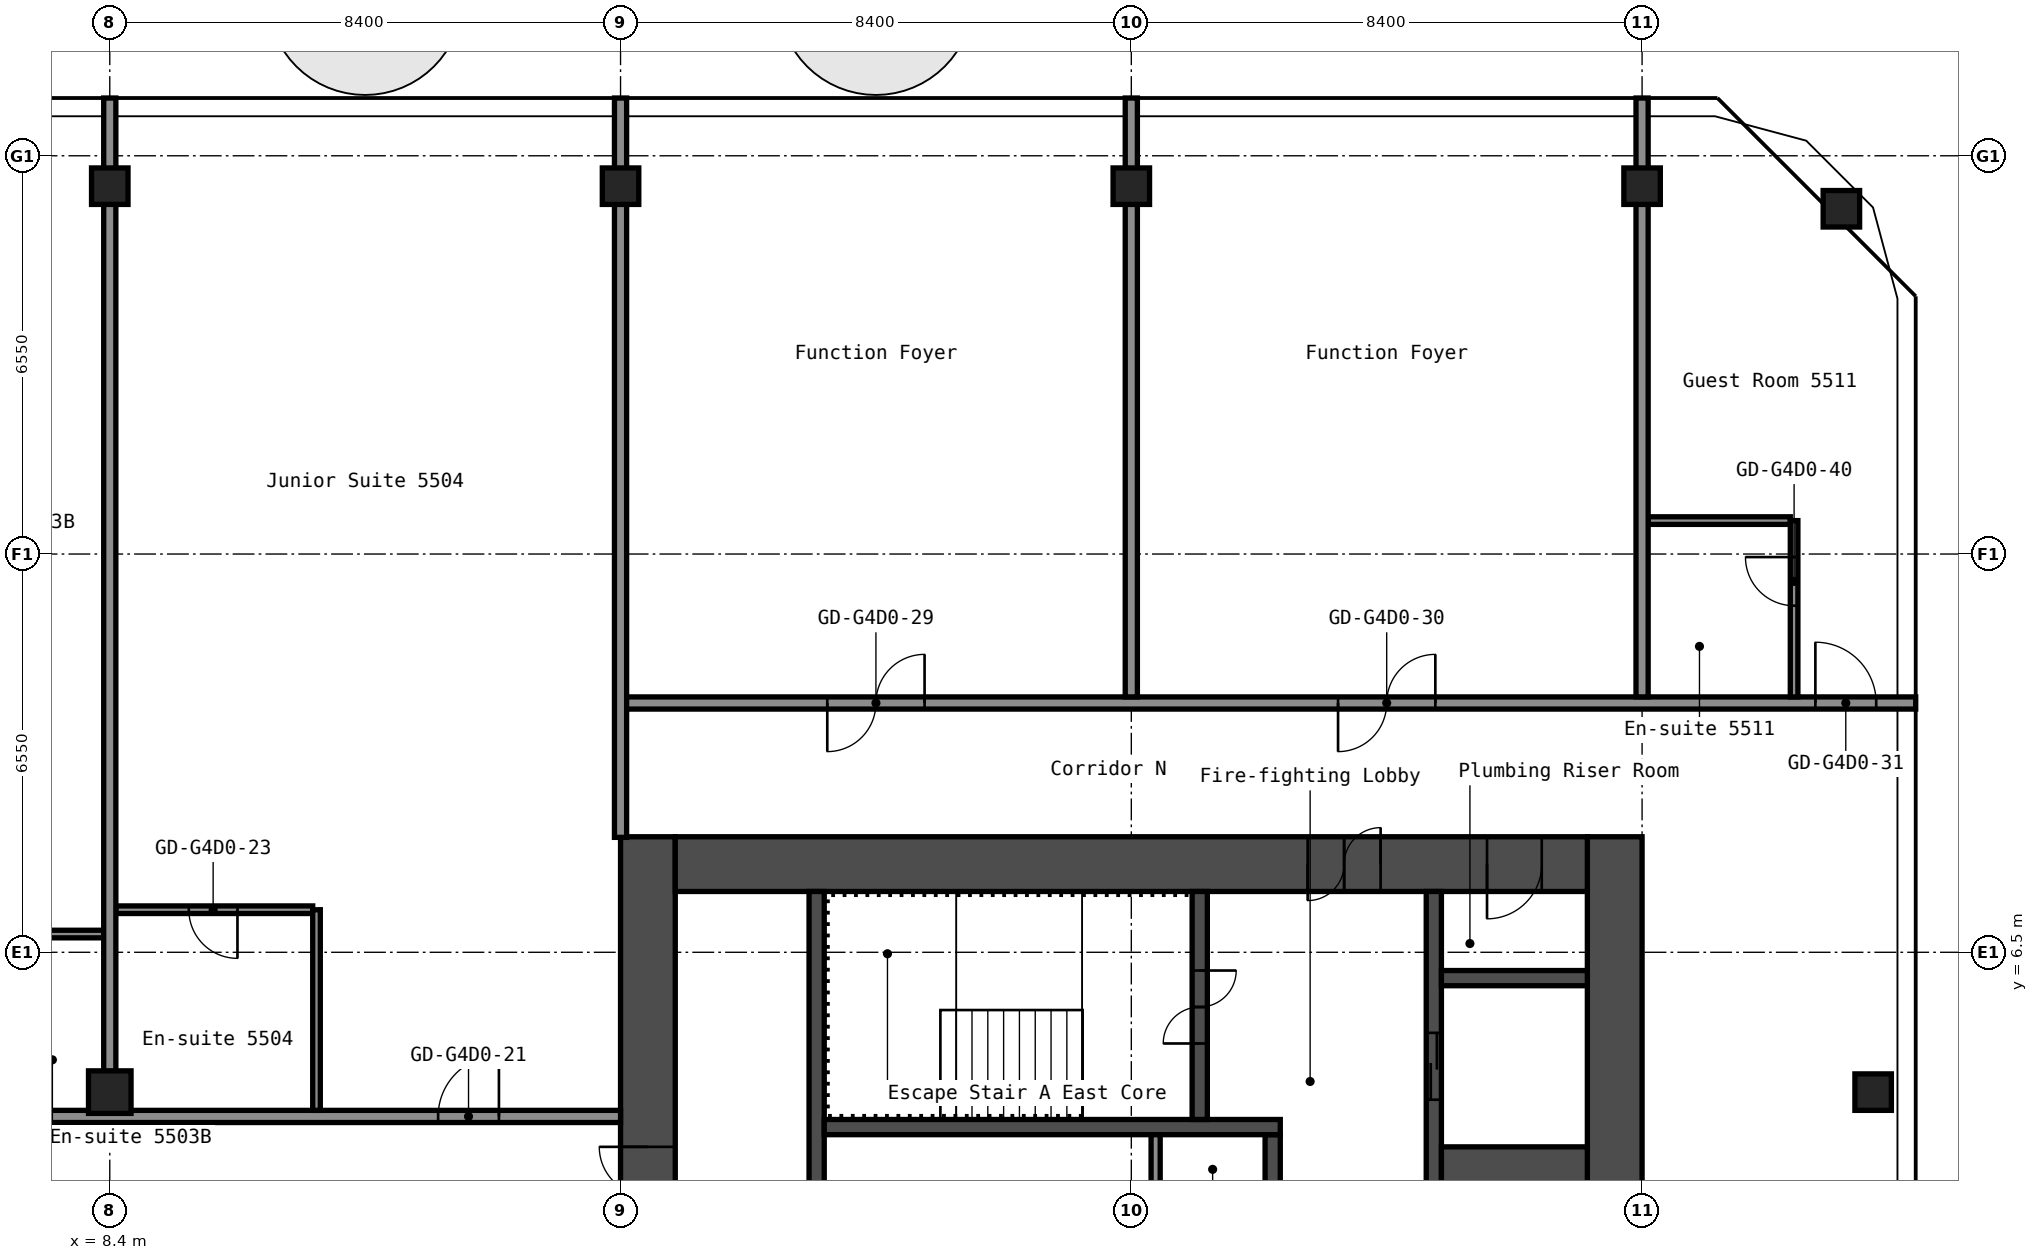
"""IFC4 building model, lengths in metres.
Left out: names, types, materials, properties, quantities, classifications, styles, units other than length and angle.
Written with IfcOpenShell. Run it as: python <this file> out.ifc"""

import sys

from ifc_helpers import new_model, si_unit, direction, frame, frame_2d, origin, origin_2d, place, context, subcontext, project, spatial, rectangle, hollow_rectangle, extrude, element, fill, save


model = new_model("IFC4")
c1 = context("Model", 3, precision=1e-05, world=origin(), true_north=direction((0.0, 1.0)))
c2 = subcontext(c1, "Body", "Model", "MODEL_VIEW")
j1 = project(units=[si_unit("LENGTHUNIT", "METRE"), si_unit("PLANEANGLEUNIT", "RADIAN")], contexts=[c1])
p1 = place(None, origin())
s1 = spatial("IfcSite", under=j1, at=p1, CompositionType="ELEMENT")
p2 = place(p1, origin())
s2 = spatial("IfcBuilding", under=s1, at=p2, CompositionType="ELEMENT")
p3 = place(p2, frame((0.0, 0.0, 196.2)))
s3 = spatial("IfcBuildingStorey", under=s2, at=p3, CompositionType="ELEMENT", Elevation=196.2)
p4 = place(p3, frame((8.4, 4.2, 0.0), z_axis=(0.0, 0.0, 1.0), x_axis=(1.0, 0.0, 0.0)))
e1 = element("IfcColumn", 1, at=p4, inside=s3, PredefinedType="COLUMN", context=c2, shape_type="SweptSolid", body=[
    extrude(hollow_rectangle(XDim=0.7, YDim=0.7, WallThickness=0.028, at=origin_2d()), origin(), (0.0, 0.0, 1.0), 2.75),
])
for number, where, z_axis, x_axis in (
    (2, (8.4, 19.1, 0.0), (0.0, 0.0, 1.0), (1.0, 0.0, 0.0)),
    (3, (16.8, 19.1, 0.0), (0.0, 0.0, 1.0), (1.0, 0.0, 0.0)),
    (4, (25.2, 19.1, 0.0), (0.0, 0.0, 1.0), (1.0, 0.0, 0.0)),
    (5, (33.6, 19.1, 0.0), (0.0, 0.0, 1.0), (1.0, 0.0, 0.0)),
    (6, (37.4, 4.2, 0.0), (0.0, 0.0, 1.0), (1.0, 0.0, 0.0)),
    (7, (36.878, 18.729, 0.0), (0.0, 0.0, 1.0), (1.0, 0.0, 0.0)),
):
    element("IfcColumn", number, at=place(p3, frame(where, z_axis=z_axis, x_axis=x_axis)), inside=s3, PredefinedType="COLUMN", context=c2, shape_type="SweptSolid", body=[
        extrude(hollow_rectangle(XDim=0.6, YDim=0.6, WallThickness=0.025, InnerFilletRadius=0.038, OuterFilletRadius=0.062, at=origin_2d()), origin(), (0.0, 0.0, 1.0), 2.75),
    ])
p5 = place(p3, frame((17.25, -8.4, 0.0), z_axis=(0.0, 0.0, 1.0), x_axis=(0.0, 1.0, 0.0)))
e8 = element("IfcWall", 8, at=p5, inside=s3, PredefinedType="SHEAR", context=c2, shape_type="SweptSolid", body=[
    extrude(rectangle(XDim=16.8, YDim=0.9, at=frame_2d((8.4, 0.0))), origin(), (0.0, 0.0, 1.0), 2.75),
])
p6 = place(p5, frame((10.1, 0.0, 0.0)))
e9 = element("IfcOpeningElement", 9, at=p6, cuts=e8, PredefinedType="OPENING", context=c2, shape_type="SweptSolid", body=[
    extrude(rectangle(XDim=1.6, YDim=2.1, at=frame_2d((0.8, 1.05))), frame((0.0, 0.46, 0.0), z_axis=(0.0, -1.0, 0.0), x_axis=(1.0, 0.0, 0.0)), (0.0, 0.0, 1.0), 0.92),
])
p7 = place(p3, frame((33.15, -8.4, 0.0), z_axis=(0.0, 0.0, 1.0), x_axis=(0.0, 1.0, 0.0)))
e10 = element("IfcWall", 10, at=p7, inside=s3, PredefinedType="SHEAR", context=c2, shape_type="SweptSolid", body=[
    extrude(rectangle(XDim=16.8, YDim=0.9, at=frame_2d((8.4, 0.0))), origin(), (0.0, 0.0, 1.0), 2.75),
])
p8 = place(p3, frame((17.7, 7.95, 0.0), z_axis=(0.0, 0.0, 1.0), x_axis=(1.0, 0.0, 0.0)))
e11 = element("IfcWall", 11, at=p8, inside=s3, PredefinedType="SHEAR", context=c2, shape_type="SweptSolid", body=[
    extrude(rectangle(XDim=15.0, YDim=0.9, at=frame_2d((7.5, 0.0))), origin(), (0.0, 0.0, 1.0), 2.75),
])
p9 = place(p8, frame((10.4, 0.0, 0.0)))
e12 = element("IfcOpeningElement", 12, at=p9, cuts=e11, PredefinedType="OPENING", context=c2, shape_type="SweptSolid", body=[
    extrude(rectangle(XDim=1.2, YDim=2.1, at=frame_2d((0.6, 1.05))), frame((0.0, 0.46, 0.0), z_axis=(0.0, -1.0, 0.0), x_axis=(1.0, 0.0, 0.0)), (0.0, 0.0, 1.0), 0.92),
])
p10 = place(p8, frame((13.35, 0.0, 0.0)))
e13 = element("IfcOpeningElement", 13, at=p10, cuts=e11, PredefinedType="OPENING", context=c2, shape_type="SweptSolid", body=[
    extrude(rectangle(XDim=0.9, YDim=2.1, at=frame_2d((0.45, 1.05))), frame((0.0, 0.46, 0.0), z_axis=(0.0, -1.0, 0.0), x_axis=(1.0, 0.0, 0.0)), (0.0, 0.0, 1.0), 0.92),
])
p11 = place(p3, frame((20.025, 1.2, 0.0), z_axis=(0.0, 0.0, 1.0), x_axis=(0.0, 1.0, 0.0)))
e14 = element("IfcWall", 14, at=p11, inside=s3, PredefinedType="SHEAR", context=c2, shape_type="SweptSolid", body=[
    extrude(rectangle(XDim=6.3, YDim=0.25, at=frame_2d((3.15, 0.0))), origin(), (0.0, 0.0, 1.0), 2.75),
])
p12 = place(p3, frame((27.525, 1.45, 0.0), z_axis=(0.0, 0.0, 1.0), x_axis=(0.0, 1.0, 0.0)))
e15 = element("IfcWall", 15, at=p12, inside=s3, PredefinedType="SHEAR", context=c2, shape_type="SweptSolid", body=[
    extrude(rectangle(XDim=2.05, YDim=0.25, at=frame_2d((1.025, 0.0))), origin(), (0.0, 0.0, 1.0), 2.75),
])
p13 = place(p3, frame((20.15, 3.625, 0.0), z_axis=(0.0, 0.0, 1.0), x_axis=(1.0, 0.0, 0.0)))
e16 = element("IfcWall", 16, at=p13, inside=s3, PredefinedType="SHEAR", context=c2, shape_type="SweptSolid", body=[
    extrude(rectangle(XDim=7.5, YDim=0.25, at=frame_2d((3.75, 0.0))), origin(), (0.0, 0.0, 1.0), 2.75),
])
p14 = place(p3, frame((26.325, 3.75, 0.0), z_axis=(0.0, 0.0, 1.0), x_axis=(0.0, 1.0, 0.0)))
e17 = element("IfcWall", 17, at=p14, inside=s3, PredefinedType="SHEAR", context=c2, shape_type="SweptSolid", body=[
    extrude(rectangle(XDim=3.75, YDim=0.25, at=frame_2d((1.875, 0.0))), origin(), (0.0, 0.0, 1.0), 2.75),
])
p15 = place(p14, frame((1.25, 0.0, 0.0)))
e18 = element("IfcOpeningElement", 18, at=p15, cuts=e17, PredefinedType="OPENING", context=c2, shape_type="SweptSolid", body=[
    extrude(rectangle(XDim=1.2, YDim=2.1, at=frame_2d((0.6, 1.05))), frame((0.0, 0.135, 0.0), z_axis=(0.0, -1.0, 0.0), x_axis=(1.0, 0.0, 0.0)), (0.0, 0.0, 1.0), 0.27),
])
p16 = place(p3, frame((30.175, 1.45, 0.0), z_axis=(0.0, 0.0, 1.0), x_axis=(0.0, 1.0, 0.0)))
e19 = element("IfcWall", 19, at=p16, inside=s3, PredefinedType="SHEAR", context=c2, shape_type="SweptSolid", body=[
    extrude(rectangle(XDim=6.05, YDim=0.25, at=frame_2d((3.025, 0.0))), origin(), (0.0, 0.0, 1.0), 2.75),
])
p17 = place(p16, frame((2.625, 0.0, 0.0)))
e20 = element("IfcOpeningElement", 20, at=p17, cuts=e19, PredefinedType="OPENING", context=c2, shape_type="SweptSolid", body=[
    extrude(rectangle(XDim=1.1, YDim=2.1, at=frame_2d((0.55, 1.05))), frame((0.0, 0.135, 0.0), z_axis=(0.0, -1.0, 0.0), x_axis=(1.0, 0.0, 0.0)), (0.0, 0.0, 1.0), 0.27),
])
p18 = place(p3, frame((30.3, 2.375, 0.0), z_axis=(0.0, 0.0, 1.0), x_axis=(1.0, 0.0, 0.0)))
e21 = element("IfcWall", 21, at=p18, inside=s3, PredefinedType="SHEAR", context=c2, shape_type="SweptSolid", body=[
    extrude(rectangle(XDim=2.4, YDim=1.85, at=frame_2d((1.2, 0.0))), origin(), (0.0, 0.0, 1.0), 2.75),
])
p19 = place(p3, frame((30.3, 6.075, 0.0), z_axis=(0.0, 0.0, 1.0), x_axis=(1.0, 0.0, 0.0)))
e22 = element("IfcWall", 22, at=p19, inside=s3, PredefinedType="SHEAR", context=c2, shape_type="SweptSolid", body=[
    extrude(rectangle(XDim=2.4, YDim=0.25, at=frame_2d((1.2, 0.0))), origin(), (0.0, 0.0, 1.0), 2.75),
])
p20 = place(p3, frame((25.6, 1.45, 0.0), z_axis=(0.0, 0.0, 1.0), x_axis=(0.0, 1.0, 0.0)))
e23 = element("IfcWall", 23, at=p20, inside=s3, PredefinedType="PARTITIONING", context=c2, shape_type="SweptSolid", body=[
    extrude(rectangle(XDim=2.05, YDim=0.15, at=frame_2d((1.025, 0.0))), origin(), (0.0, 0.0, 1.0), 2.75),
])
p21 = place(p3, frame((-16.8, 3.8, 0.0), z_axis=(0.0, 0.0, 1.0), x_axis=(1.0, 0.0, 0.0)))
e24 = element("IfcWall", 24, at=p21, inside=s3, PredefinedType="PARTITIONING", context=c2, shape_type="SweptSolid", body=[
    extrude(rectangle(XDim=33.6, YDim=0.2, at=frame_2d((16.8, 0.0))), origin(), (0.0, 0.0, 1.0), 2.75),
])
p22 = place(p21, frame((2.85, 0.0, 0.0)))
e25 = element("IfcOpeningElement", 25, at=p22, cuts=e24, PredefinedType="OPENING", context=c2, shape_type="SweptSolid", body=[
    extrude(rectangle(XDim=1.0, YDim=2.1, at=frame_2d((0.5, 1.05))), frame((0.0, 0.11, 0.0), z_axis=(0.0, -1.0, 0.0), x_axis=(1.0, 0.0, 0.0)), (0.0, 0.0, 1.0), 0.22),
])
p23 = place(p21, frame((4.55, 0.0, 0.0)))
e26 = element("IfcOpeningElement", 26, at=p23, cuts=e24, PredefinedType="OPENING", context=c2, shape_type="SweptSolid", body=[
    extrude(rectangle(XDim=1.0, YDim=2.1, at=frame_2d((0.5, 1.05))), frame((0.0, 0.11, 0.0), z_axis=(0.0, -1.0, 0.0), x_axis=(1.0, 0.0, 0.0)), (0.0, 0.0, 1.0), 0.22),
])
p24 = place(p21, frame((10.4, 0.0, 0.0)))
e27 = element("IfcOpeningElement", 27, at=p24, cuts=e24, PredefinedType="OPENING", context=c2, shape_type="SweptSolid", body=[
    extrude(rectangle(XDim=1.0, YDim=2.1, at=frame_2d((0.5, 1.05))), frame((0.0, 0.11, 0.0), z_axis=(0.0, -1.0, 0.0), x_axis=(1.0, 0.0, 0.0)), (0.0, 0.0, 1.0), 0.22),
])
p25 = place(p21, frame((19.65, 0.0, 0.0)))
e28 = element("IfcOpeningElement", 28, at=p25, cuts=e24, PredefinedType="OPENING", context=c2, shape_type="SweptSolid", body=[
    extrude(rectangle(XDim=1.0, YDim=2.1, at=frame_2d((0.5, 1.05))), frame((0.0, 0.11, 0.0), z_axis=(0.0, -1.0, 0.0), x_axis=(1.0, 0.0, 0.0)), (0.0, 0.0, 1.0), 0.22),
])
p26 = place(p21, frame((21.35, 0.0, 0.0)))
e29 = element("IfcOpeningElement", 29, at=p26, cuts=e24, PredefinedType="OPENING", context=c2, shape_type="SweptSolid", body=[
    extrude(rectangle(XDim=1.0, YDim=2.1, at=frame_2d((0.5, 1.05))), frame((0.0, 0.11, 0.0), z_axis=(0.0, -1.0, 0.0), x_axis=(1.0, 0.0, 0.0)), (0.0, 0.0, 1.0), 0.22),
])
p27 = place(p21, frame((30.6, 0.0, 0.0)))
e30 = element("IfcOpeningElement", 30, at=p27, cuts=e24, PredefinedType="OPENING", context=c2, shape_type="SweptSolid", body=[
    extrude(rectangle(XDim=1.0, YDim=2.1, at=frame_2d((0.5, 1.05))), frame((0.0, 0.11, 0.0), z_axis=(0.0, -1.0, 0.0), x_axis=(1.0, 0.0, 0.0)), (0.0, 0.0, 1.0), 0.22),
])
p28 = place(p3, frame((5.962, 6.8, 0.0), z_axis=(0.0, 0.0, 1.0), x_axis=(1.0, 0.0, 0.0)))
e31 = element("IfcWall", 31, at=p28, inside=s3, PredefinedType="PARTITIONING", context=c2, shape_type="SweptSolid", body=[
    extrude(rectangle(XDim=2.338, YDim=0.125, at=frame_2d((1.169, 0.0))), origin(), (0.0, 0.0, 1.0), 2.75),
])
p29 = place(p3, frame((8.5, 7.2, 0.0), z_axis=(0.0, 0.0, 1.0), x_axis=(1.0, 0.0, 0.0)))
e32 = element("IfcWall", 32, at=p29, inside=s3, PredefinedType="PARTITIONING", context=c2, shape_type="SweptSolid", body=[
    extrude(rectangle(XDim=3.238, YDim=0.125, at=frame_2d((1.619, 0.0))), origin(), (0.0, 0.0, 1.0), 2.75),
])
p30 = place(p29, frame((1.2, 0.0, 0.0)))
e33 = element("IfcOpeningElement", 33, at=p30, cuts=e32, PredefinedType="OPENING", context=c2, shape_type="SweptSolid", body=[
    extrude(rectangle(XDim=0.8, YDim=2.1, at=frame_2d((0.4, 1.05))), frame((0.0, 0.073, 0.0), z_axis=(0.0, -1.0, 0.0), x_axis=(1.0, 0.0, 0.0)), (0.0, 0.0, 1.0), 0.145),
])
p31 = place(p3, frame((16.8, 10.6, 0.0), z_axis=(0.0, 0.0, 1.0), x_axis=(1.0, 0.0, 0.0)))
e34 = element("IfcWall", 34, at=p31, inside=s3, PredefinedType="PARTITIONING", context=c2, shape_type="SweptSolid", body=[
    extrude(rectangle(XDim=21.3, YDim=0.2, at=frame_2d((10.65, 0.0))), origin(), (0.0, 0.0, 1.0), 2.75),
])
p32 = place(p31, frame((3.4, 0.0, 0.0)))
e35 = element("IfcOpeningElement", 35, at=p32, cuts=e34, PredefinedType="OPENING", context=c2, shape_type="SweptSolid", body=[
    extrude(rectangle(XDim=1.6, YDim=2.1, at=frame_2d((0.8, 1.05))), frame((0.0, 0.11, 0.0), z_axis=(0.0, -1.0, 0.0), x_axis=(1.0, 0.0, 0.0)), (0.0, 0.0, 1.0), 0.22),
])
p33 = place(p31, frame((11.8, 0.0, 0.0)))
e36 = element("IfcOpeningElement", 36, at=p33, cuts=e34, PredefinedType="OPENING", context=c2, shape_type="SweptSolid", body=[
    extrude(rectangle(XDim=1.6, YDim=2.1, at=frame_2d((0.8, 1.05))), frame((0.0, 0.11, 0.0), z_axis=(0.0, -1.0, 0.0), x_axis=(1.0, 0.0, 0.0)), (0.0, 0.0, 1.0), 0.22),
])
p34 = place(p31, frame((19.65, 0.0, 0.0)))
e37 = element("IfcOpeningElement", 37, at=p34, cuts=e34, PredefinedType="OPENING", context=c2, shape_type="SweptSolid", body=[
    extrude(rectangle(XDim=1.0, YDim=2.1, at=frame_2d((0.5, 1.05))), frame((0.0, 0.11, 0.0), z_axis=(0.0, -1.0, 0.0), x_axis=(1.0, 0.0, 0.0)), (0.0, 0.0, 1.0), 0.22),
])
p35 = place(p3, frame((33.7, 13.6, 0.0), z_axis=(0.0, 0.0, 1.0), x_axis=(1.0, 0.0, 0.0)))
e38 = element("IfcWall", 38, at=p35, inside=s3, PredefinedType="PARTITIONING", context=c2, shape_type="SweptSolid", body=[
    extrude(rectangle(XDim=2.338, YDim=0.125, at=frame_2d((1.169, 0.0))), origin(), (0.0, 0.0, 1.0), 2.75),
])
p36 = place(p3, frame((8.4, 4.54, 0.0), z_axis=(0.0, 0.0, 1.0), x_axis=(0.0, 1.0, 0.0)))
e39 = element("IfcWall", 39, at=p36, inside=s3, PredefinedType="PARTITIONING", context=c2, shape_type="SweptSolid", body=[
    extrude(rectangle(XDim=16.01, YDim=0.2, at=frame_2d((8.005, 0.0))), origin(), (0.0, 0.0, 1.0), 2.75),
])
p37 = place(p3, frame((11.8, 3.9, 0.0), z_axis=(0.0, 0.0, 1.0), x_axis=(0.0, 1.0, 0.0)))
e40 = element("IfcWall", 40, at=p37, inside=s3, PredefinedType="PARTITIONING", context=c2, shape_type="SweptSolid", body=[
    extrude(rectangle(XDim=3.3, YDim=0.125, at=frame_2d((1.65, 0.0))), origin(), (0.0, 0.0, 1.0), 2.75),
])
p38 = place(p3, frame((16.8, 8.39, 0.0), z_axis=(0.0, 0.0, 1.0), x_axis=(0.0, 1.0, 0.0)))
e41 = element("IfcWall", 41, at=p38, inside=s3, PredefinedType="PARTITIONING", context=c2, shape_type="SweptSolid", body=[
    extrude(rectangle(XDim=12.16, YDim=0.2, at=frame_2d((6.08, 0.0))), origin(), (0.0, 0.0, 1.0), 2.75),
])
for number, where, z_axis, x_axis in (
    (42, (25.2, 10.7, 0.0), (0.0, 0.0, 1.0), (0.0, 1.0, 0.0)),
    (43, (33.6, 10.7, 0.0), (0.0, 0.0, 1.0), (0.0, 1.0, 0.0)),
):
    element("IfcWall", number, at=place(p3, frame(where, z_axis=z_axis, x_axis=x_axis)), inside=s3, PredefinedType="PARTITIONING", context=c2, shape_type="SweptSolid", body=[
        extrude(rectangle(XDim=9.85, YDim=0.2, at=frame_2d((4.925, 0.0))), origin(), (0.0, 0.0, 1.0), 2.75),
    ])
p39 = place(p3, frame((36.1, 10.7, 0.0), z_axis=(0.0, 0.0, 1.0), x_axis=(0.0, 1.0, 0.0)))
e44 = element("IfcWall", 44, at=p39, inside=s3, PredefinedType="PARTITIONING", context=c2, shape_type="SweptSolid", body=[
    extrude(rectangle(XDim=2.9, YDim=0.125, at=frame_2d((1.45, 0.0))), origin(), (0.0, 0.0, 1.0), 2.75),
])
p40 = place(p39, frame((1.5, 0.0, 0.0)))
e45 = element("IfcOpeningElement", 45, at=p40, cuts=e44, PredefinedType="OPENING", context=c2, shape_type="SweptSolid", body=[
    extrude(rectangle(XDim=0.8, YDim=2.1, at=frame_2d((0.4, 1.05))), frame((0.0, 0.073, 0.0), z_axis=(0.0, -1.0, 0.0), x_axis=(1.0, 0.0, 0.0)), (0.0, 0.0, 1.0), 0.145),
])
p41 = place(p6, origin())
e46 = element("IfcDoor", 46, at=p41, inside=s3, OperationType="DOUBLE_DOOR_SINGLE_SWING", PredefinedType="DOOR", context=c2, shape_type="SweptSolid", body=[
    extrude(rectangle(XDim=1.6, YDim=2.1, at=frame_2d((0.8, 1.05))), frame((0.0, 0.025, 0.0), z_axis=(0.0, -1.0, 0.0), x_axis=(1.0, 0.0, 0.0)), (0.0, 0.0, 1.0), 0.05),
])
fill(e9, e46)
p42 = place(p9, origin())
e47 = element("IfcDoor", 47, at=p42, inside=s3, OperationType="DOUBLE_DOOR_SINGLE_SWING", PredefinedType="DOOR", context=c2, shape_type="SweptSolid", body=[
    extrude(rectangle(XDim=1.2, YDim=2.1, at=frame_2d((0.6, 1.05))), frame((0.0, 0.025, 0.0), z_axis=(0.0, -1.0, 0.0), x_axis=(1.0, 0.0, 0.0)), (0.0, 0.0, 1.0), 0.05),
])
fill(e12, e47)
p43 = place(p10, origin())
e48 = element("IfcDoor", 48, at=p43, inside=s3, OperationType="SINGLE_SWING_LEFT", PredefinedType="DOOR", context=c2, shape_type="SweptSolid", body=[
    extrude(rectangle(XDim=0.9, YDim=2.1, at=frame_2d((0.45, 1.05))), frame((0.0, 0.025, 0.0), z_axis=(0.0, -1.0, 0.0), x_axis=(1.0, 0.0, 0.0)), (0.0, 0.0, 1.0), 0.05),
])
fill(e13, e48)
p44 = place(p15, origin())
e49 = element("IfcDoor", 49, at=p44, inside=s3, OperationType="DOUBLE_DOOR_SINGLE_SWING", PredefinedType="DOOR", context=c2, shape_type="SweptSolid", body=[
    extrude(rectangle(XDim=1.2, YDim=2.1, at=frame_2d((0.6, 1.05))), frame((0.0, 0.025, 0.0), z_axis=(0.0, -1.0, 0.0), x_axis=(1.0, 0.0, 0.0)), (0.0, 0.0, 1.0), 0.05),
])
fill(e18, e49)
p45 = place(p17, origin())
e50 = element("IfcDoor", 50, at=p45, inside=s3, OperationType="DOUBLE_DOOR_SLIDING", PredefinedType="DOOR", context=c2, shape_type="SweptSolid", body=[
    extrude(rectangle(XDim=1.1, YDim=2.1, at=frame_2d((0.55, 1.05))), frame((0.0, 0.025, 0.0), z_axis=(0.0, -1.0, 0.0), x_axis=(1.0, 0.0, 0.0)), (0.0, 0.0, 1.0), 0.05),
])
fill(e20, e50)
p46 = place(p27, origin())
e51 = element("IfcDoor", 51, at=p46, inside=s3, OperationType="SINGLE_SWING_LEFT", PredefinedType="DOOR", context=c2, shape_type="SweptSolid", body=[
    extrude(rectangle(XDim=1.0, YDim=2.1, at=frame_2d((0.5, 1.05))), frame((0.0, 0.025, 0.0), z_axis=(0.0, -1.0, 0.0), x_axis=(1.0, 0.0, 0.0)), (0.0, 0.0, 1.0), 0.05),
])
fill(e30, e51)
p47 = place(p30, origin())
e52 = element("IfcDoor", 52, at=p47, inside=s3, OperationType="SINGLE_SWING_RIGHT", PredefinedType="DOOR", context=c2, shape_type="SweptSolid", body=[
    extrude(rectangle(XDim=0.8, YDim=2.1, at=frame_2d((0.4, 1.05))), frame((0.0, 0.025, 0.0), z_axis=(0.0, -1.0, 0.0), x_axis=(1.0, 0.0, 0.0)), (0.0, 0.0, 1.0), 0.05),
])
fill(e33, e52)
p48 = place(p32, origin())
e53 = element("IfcDoor", 53, at=p48, inside=s3, OperationType="DOUBLE_DOOR_SINGLE_SWING", PredefinedType="DOOR", context=c2, shape_type="SweptSolid", body=[
    extrude(rectangle(XDim=1.6, YDim=2.1, at=frame_2d((0.8, 1.05))), frame((0.0, 0.025, 0.0), z_axis=(0.0, -1.0, 0.0), x_axis=(1.0, 0.0, 0.0)), (0.0, 0.0, 1.0), 0.05),
])
fill(e35, e53)
p49 = place(p33, origin())
e54 = element("IfcDoor", 54, at=p49, inside=s3, OperationType="DOUBLE_DOOR_SINGLE_SWING", PredefinedType="DOOR", context=c2, shape_type="SweptSolid", body=[
    extrude(rectangle(XDim=1.6, YDim=2.1, at=frame_2d((0.8, 1.05))), frame((0.0, 0.025, 0.0), z_axis=(0.0, -1.0, 0.0), x_axis=(1.0, 0.0, 0.0)), (0.0, 0.0, 1.0), 0.05),
])
fill(e36, e54)
p50 = place(p34, origin())
e55 = element("IfcDoor", 55, at=p50, inside=s3, OperationType="SINGLE_SWING_RIGHT", PredefinedType="DOOR", context=c2, shape_type="SweptSolid", body=[
    extrude(rectangle(XDim=1.0, YDim=2.1, at=frame_2d((0.5, 1.05))), frame((0.0, 0.025, 0.0), z_axis=(0.0, -1.0, 0.0), x_axis=(1.0, 0.0, 0.0)), (0.0, 0.0, 1.0), 0.05),
])
fill(e37, e55)
p51 = place(p40, origin())
e56 = element("IfcDoor", 56, at=p51, inside=s3, OperationType="SINGLE_SWING_LEFT", PredefinedType="DOOR", context=c2, shape_type="SweptSolid", body=[
    extrude(rectangle(XDim=0.8, YDim=2.1, at=frame_2d((0.4, 1.05))), frame((0.0, 0.025, 0.0), z_axis=(0.0, -1.0, 0.0), x_axis=(1.0, 0.0, 0.0)), (0.0, 0.0, 1.0), 0.05),
])
fill(e45, e56)
save(model, sys.argv[1])
